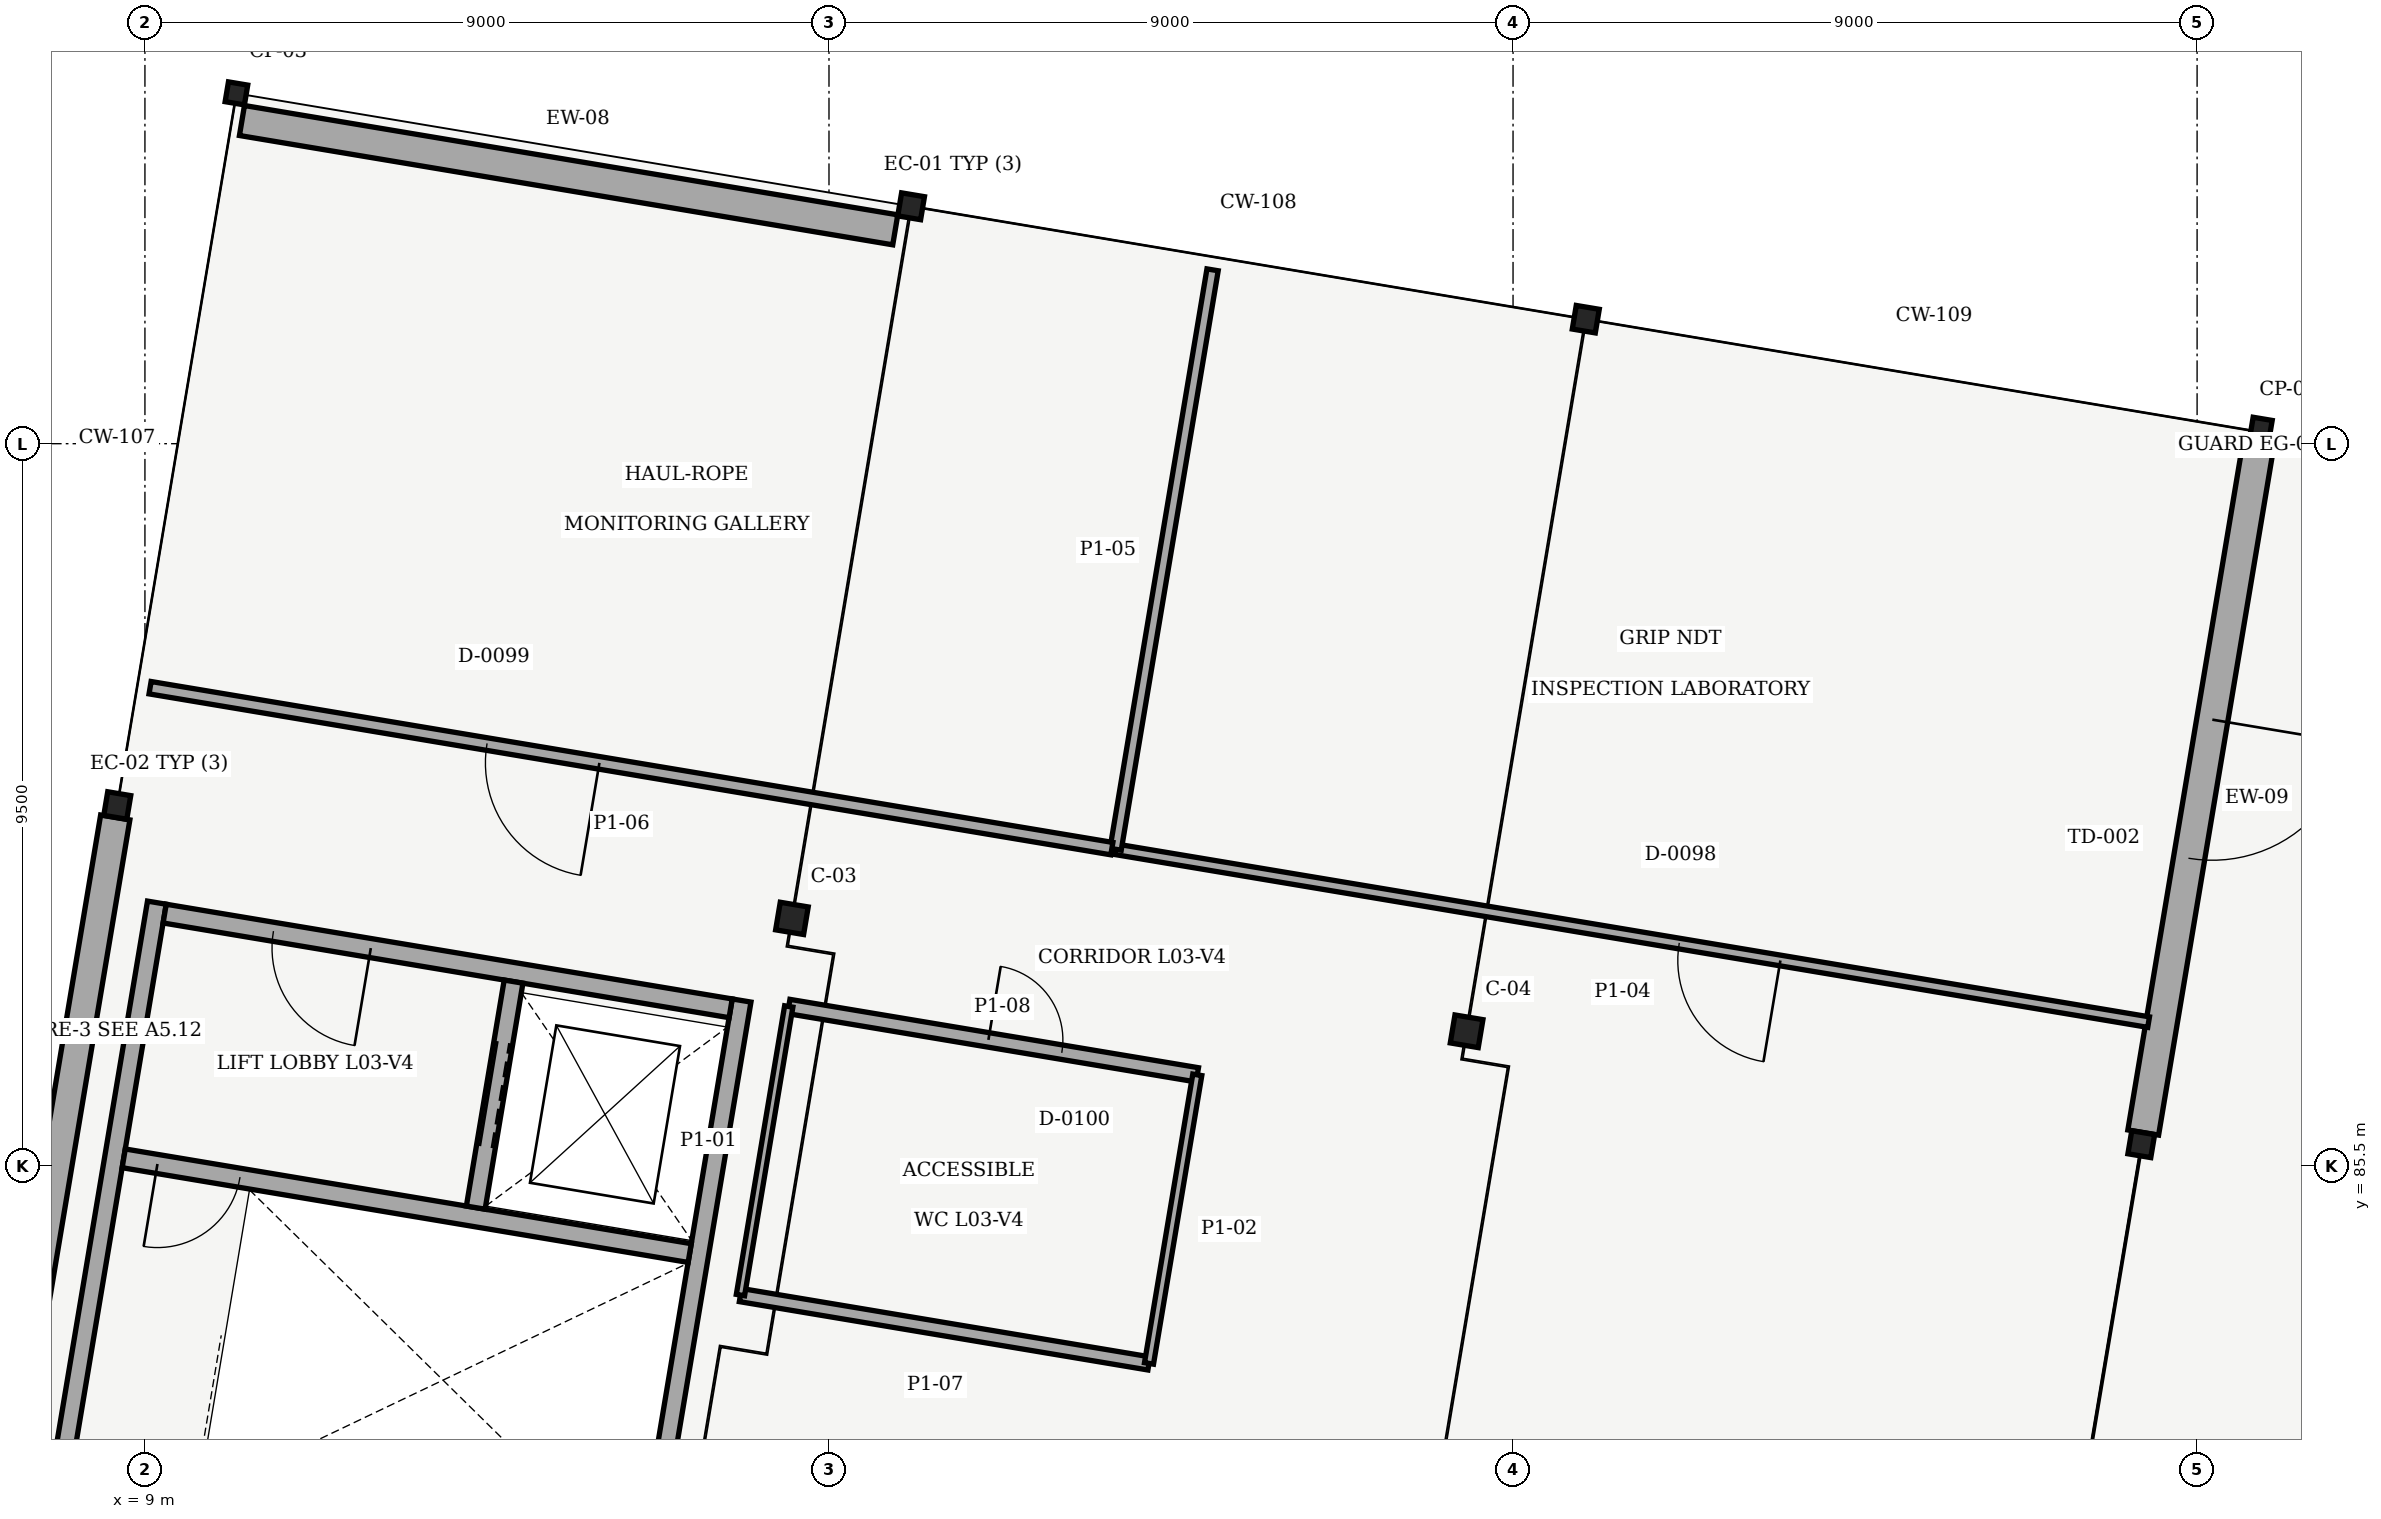
"""IFC4 building model, lengths in metres.
Left out: names, types, materials, properties, quantities, classifications, styles, units other than length and angle.
Written with IfcOpenShell. Run it as: python <this file> out.ifc"""

import sys

from ifc_helpers import new_model, si_unit, direction, frame, frame_2d, origin, origin_with_axes, origin_2d, place, context, subcontext, project, spatial, rectangle, i_section, extrude, element, fill, save


model = new_model("IFC4")
c1 = context("Model", 3, precision=1e-05, world=origin(), true_north=direction((0.0, 1.0)))
c2 = subcontext(c1, "Body", "Model", "MODEL_VIEW")
j1 = project(units=[si_unit("LENGTHUNIT", "METRE"), si_unit("PLANEANGLEUNIT", "RADIAN")], contexts=[c1])
p1 = place(None, origin())
s1 = spatial("IfcSite", under=j1, at=p1, CompositionType="ELEMENT")
p2 = place(p1, origin())
s2 = spatial("IfcBuilding", under=s1, at=p2, CompositionType="ELEMENT")
p3 = place(p2, frame((0.0, 0.0, 14.4)))
s3 = spatial("IfcBuildingStorey", under=s2, at=p3, CompositionType="ELEMENT", Elevation=14.4)
p4 = place(p3, frame((8.636, 90.24, 0.0), z_axis=(0.0, 0.0, 1.0), x_axis=(0.986285601537, -0.165047605861, 0.0)))
e1 = element("IfcColumn", 1, at=p4, inside=s3, PredefinedType="COLUMN", context=c2, shape_type="SweptSolid", body=[
    extrude(i_section(OverallWidth=0.307, OverallDepth=0.315, WebThickness=0.012, FlangeThickness=0.019, FilletRadius=0.013, at=origin_2d()), origin(), (0.0, 0.0, 1.0), 4.8),
])
p5 = place(p3, frame((10.204, 99.609, 0.0), z_axis=(0.0, 0.0, 1.0), x_axis=(0.986285601537, -0.165047605861, 0.0)))
e2 = element("IfcColumn", 2, at=p5, inside=s3, PredefinedType="PILASTER", context=c2, shape_type="SweptSolid", body=[
    extrude(i_section(OverallWidth=0.257, OverallDepth=0.264, WebThickness=0.012, FlangeThickness=0.02, FilletRadius=0.009, at=origin_2d()), origin(), (0.0, 0.0, 1.0), 4.8),
])
p6 = place(p3, frame((17.512, 88.754, 0.0), z_axis=(0.0, 0.0, 1.0), x_axis=(0.986285601537, -0.165047605861, 0.0)))
e3 = element("IfcColumn", 3, at=p6, inside=s3, PredefinedType="COLUMN", context=c2, shape_type="SweptSolid", body=[
    extrude(i_section(OverallWidth=0.373, OverallDepth=0.368, WebThickness=0.015, FlangeThickness=0.024, FilletRadius=0.015, at=origin_2d()), origin(), (0.0, 0.0, 1.0), 4.8),
])
p7 = place(p3, frame((19.08, 98.124, 0.0), z_axis=(0.0, 0.0, 1.0), x_axis=(0.986285601537, -0.165047605861, 0.0)))
e4 = element("IfcColumn", 4, at=p7, inside=s3, PredefinedType="COLUMN", context=c2, shape_type="SweptSolid", body=[
    extrude(i_section(OverallWidth=0.305, OverallDepth=0.307, WebThickness=0.01, FlangeThickness=0.015, FilletRadius=0.013, at=origin_2d()), origin(), (0.0, 0.0, 1.0), 4.8),
])
p8 = place(p3, frame((26.389, 87.269, 0.0), z_axis=(0.0, 0.0, 1.0), x_axis=(0.986285601537, -0.165047605861, 0.0)))
e5 = element("IfcColumn", 5, at=p8, inside=s3, PredefinedType="COLUMN", context=c2, shape_type="SweptSolid", body=[
    extrude(i_section(OverallWidth=0.373, OverallDepth=0.373, WebThickness=0.016, FlangeThickness=0.026, FilletRadius=0.015, at=origin_2d()), origin(), (0.0, 0.0, 1.0), 4.8),
])
p9 = place(p3, frame((27.957, 96.638, 0.0), z_axis=(0.0, 0.0, 1.0), x_axis=(0.986285601537, -0.165047605861, 0.0)))
e6 = element("IfcColumn", 6, at=p9, inside=s3, PredefinedType="COLUMN", context=c2, shape_type="SweptSolid", body=[
    extrude(i_section(OverallWidth=0.307, OverallDepth=0.315, WebThickness=0.012, FlangeThickness=0.019, FilletRadius=0.013, at=origin_2d()), origin(), (0.0, 0.0, 1.0), 4.8),
])
p10 = place(p3, frame((35.266, 85.783, 0.0), z_axis=(0.0, 0.0, 1.0), x_axis=(0.986285601537, -0.165047605861, 0.0)))
e7 = element("IfcColumn", 7, at=p10, inside=s3, PredefinedType="COLUMN", context=c2, shape_type="SweptSolid", body=[
    extrude(i_section(OverallWidth=0.305, OverallDepth=0.307, WebThickness=0.01, FlangeThickness=0.015, FilletRadius=0.013, at=origin_2d()), origin(), (0.0, 0.0, 1.0), 4.8),
])
p11 = place(p3, frame((36.833, 95.153, 0.0), z_axis=(0.0, 0.0, 1.0), x_axis=(0.986285601537, -0.165047605861, 0.0)))
e8 = element("IfcColumn", 8, at=p11, inside=s3, PredefinedType="PILASTER", context=c2, shape_type="SweptSolid", body=[
    extrude(i_section(OverallWidth=0.254, OverallDepth=0.353, WebThickness=0.01, FlangeThickness=0.016, FilletRadius=0.012, at=origin_2d()), origin(), (0.0, 0.0, 1.0), 4.8),
])
p12 = place(p3, frame((7.094, 81.027, 0.0), z_axis=(0.0, 0.0, 1.0), x_axis=(0.165058728342, 0.986283740208, 0.0)))
e9 = element("IfcWall", 9, at=p12, inside=s3, PredefinedType="SOLIDWALL", context=c2, shape_type="SweptSolid", body=[
    extrude(rectangle(XDim=9.181, YDim=0.39, at=frame_2d((4.59, 0.0))), origin(), (0.0, 0.0, 1.0), 3.4),
])
p13 = place(p3, frame((10.276, 99.252, 0.0), z_axis=(0.0, 0.0, 1.0), x_axis=(0.986288479978, -0.165030404055, 0.0)))
e10 = element("IfcWall", 10, at=p13, inside=s3, PredefinedType="SOLIDWALL", context=c2, shape_type="SweptSolid", body=[
    extrude(rectangle(XDim=8.715, YDim=0.4, at=frame_2d((4.357, 0.0))), origin(), (0.0, 0.0, 1.0), 3.4),
])
p14 = place(p3, frame((36.804, 94.977, 0.0), z_axis=(0.0, 0.0, 1.0), x_axis=(-0.165059797175, -0.986283561333, 0.0)))
e11 = element("IfcWall", 11, at=p14, inside=s3, PredefinedType="SOLIDWALL", context=c2, shape_type="SweptSolid", body=[
    extrude(rectangle(XDim=9.166, YDim=0.41, at=frame_2d((4.583, 0.0))), origin(), (0.0, 0.0, 1.0), 3.4),
])
p15 = place(p14, frame((3.658, 0.0, 0.0)))
e12 = element("IfcOpeningElement", 12, at=p15, cuts=e11, PredefinedType="OPENING", context=c2, shape_type="SweptSolid", body=[
    extrude(rectangle(XDim=1.85, YDim=2.2, at=frame_2d((0.925, 1.1))), frame((0.0, 0.215, 0.0), z_axis=(0.0, -1.0, 0.0), x_axis=(1.0, 0.0, 0.0)), (0.0, 0.0, 1.0), 0.43),
])
for number, where, z_axis, x_axis in (
    (13, (7.856, 81.184, 0.0), (0.0, 0.0, 1.0), (0.165, 0.986, 0.0)),
    (14, (15.549, 79.897, 0.0), (0.0, 0.0, 1.0), (0.165, 0.986, 0.0)),
):
    element("IfcWall", number, at=place(p3, frame(where, z_axis=z_axis, x_axis=x_axis)), inside=s3, PredefinedType="SHEAR", context=c2, shape_type="SweptSolid", body=[
        extrude(rectangle(XDim=7.885, YDim=0.25, at=frame_2d((3.942, 0.0))), origin(), (0.0, 0.0, 1.0), 4.54),
    ])
p16 = place(p3, frame((16.167, 84.351, 0.0), z_axis=(0.0, 0.0, 1.0), x_axis=(-0.986286216974, 0.165043928115, 0.0)))
e15 = element("IfcWall", 15, at=p16, inside=s3, PredefinedType="SHEAR", context=c2, shape_type="SweptSolid", body=[
    extrude(rectangle(XDim=7.55, YDim=0.25, at=frame_2d((3.775, 0.0))), origin(), (0.0, 0.0, 1.0), 4.54),
])
p17 = place(p16, frame((6.0, 0.0, 0.0)))
e16 = element("IfcOpeningElement", 16, at=p17, cuts=e15, PredefinedType="OPENING", context=c2, shape_type="SweptSolid", body=[
    extrude(rectangle(XDim=1.1, YDim=2.15, at=frame_2d((0.55, 1.075))), frame((0.0, 0.135, 0.0), z_axis=(0.0, -1.0, 0.0), x_axis=(1.0, 0.0, 0.0)), (0.0, 0.0, 1.0), 0.27),
])
p18 = place(p3, frame((16.706, 87.571, 0.0), z_axis=(0.0, 0.0, 1.0), x_axis=(-0.98628533611, 0.165049191984, 0.0)))
e17 = element("IfcWall", 17, at=p18, inside=s3, PredefinedType="SHEAR", context=c2, shape_type="SweptSolid", body=[
    extrude(rectangle(XDim=7.55, YDim=0.25, at=frame_2d((3.775, 0.0))), origin(), (0.0, 0.0, 1.0), 4.54),
])
p19 = place(p18, frame((4.8, 0.0, 0.0)))
e18 = element("IfcOpeningElement", 18, at=p19, cuts=e17, PredefinedType="OPENING", context=c2, shape_type="SweptSolid", body=[
    extrude(rectangle(XDim=1.3, YDim=2.15, at=frame_2d((0.65, 1.075))), frame((0.0, 0.135, 0.0), z_axis=(0.0, -1.0, 0.0), x_axis=(1.0, 0.0, 0.0)), (0.0, 0.0, 1.0), 0.27),
])
p20 = place(p3, frame((13.352, 84.948, 0.0), z_axis=(0.0, 0.0, 1.0), x_axis=(0.165029254052, 0.986288672401, 0.0)))
e19 = element("IfcWall", 19, at=p20, inside=s3, PredefinedType="SHEAR", context=c2, shape_type="SweptSolid", body=[
    extrude(rectangle(XDim=3.015, YDim=0.25, at=frame_2d((1.507, 0.0))), origin(), (0.0, 0.0, 1.0), 4.54),
])
p21 = place(p20, frame((0.808, 0.0, 0.0)))
e20 = element("IfcOpeningElement", 20, at=p21, cuts=e19, PredefinedType="OPENING", context=c2, shape_type="SweptSolid", body=[
    extrude(rectangle(XDim=1.4, YDim=2.15, at=frame_2d((0.7, 1.075))), frame((0.0, 0.135, 0.0), z_axis=(0.0, -1.0, 0.0), x_axis=(1.0, 0.0, 0.0)), (0.0, 0.0, 1.0), 0.27),
])
p22 = place(p3, frame((35.362, 87.389, 0.0), z_axis=(0.0, 0.0, 1.0), x_axis=(-0.986285012336, 0.165051126748, 0.0)))
e21 = element("IfcWall", 21, at=p22, inside=s3, PredefinedType="PARTITIONING", context=c2, shape_type="SweptSolid", body=[
    extrude(rectangle(XDim=13.78, YDim=0.14, at=frame_2d((6.89, 0.0))), origin(), (0.0, 0.0, 1.0), 3.38),
])
p23 = place(p22, frame((4.912, 0.0, 0.0)))
e22 = element("IfcOpeningElement", 22, at=p23, cuts=e21, PredefinedType="OPENING", context=c2, shape_type="SweptSolid", body=[
    extrude(rectangle(XDim=1.35, YDim=2.2, at=frame_2d((0.675, 1.1))), frame((0.0, 0.08, 0.0), z_axis=(0.0, -1.0, 0.0), x_axis=(1.0, 0.0, 0.0)), (0.0, 0.0, 1.0), 0.16),
])
p24 = place(p3, frame((21.771, 89.664, 0.0), z_axis=(0.0, 0.0, 1.0), x_axis=(0.165054518639, 0.98628444471, 0.0)))
e23 = element("IfcWall", 23, at=p24, inside=s3, PredefinedType="PARTITIONING", context=c2, shape_type="SweptSolid", body=[
    extrude(rectangle(XDim=7.73, YDim=0.15, at=frame_2d((3.865, 0.0))), origin(), (0.0, 0.0, 1.0), 3.38),
])
p25 = place(p3, frame((21.722, 89.672, 0.0), z_axis=(0.0, 0.0, 1.0), x_axis=(-0.986287257997, 0.165037706944, 0.0)))
e24 = element("IfcWall", 24, at=p25, inside=s3, PredefinedType="PARTITIONING", context=c2, shape_type="SweptSolid", body=[
    extrude(rectangle(XDim=12.83, YDim=0.165, at=frame_2d((6.415, 0.0))), origin(), (0.0, 0.0, 1.0), 3.38),
])
p26 = place(p25, frame((6.836, 0.0, 0.0)))
e25 = element("IfcOpeningElement", 25, at=p26, cuts=e24, PredefinedType="OPENING", context=c2, shape_type="SweptSolid", body=[
    extrude(rectangle(XDim=1.5, YDim=2.2, at=frame_2d((0.75, 1.1))), frame((0.0, 0.093, 0.0), z_axis=(0.0, -1.0, 0.0), x_axis=(1.0, 0.0, 0.0)), (0.0, 0.0, 1.0), 0.185),
])
p27 = place(p3, frame((22.21, 82.898, 0.0), z_axis=(0.0, 0.0, 1.0), x_axis=(-0.986281096267, 0.165074526036, 0.0)))
e26 = element("IfcWall", 26, at=p27, inside=s3, PredefinedType="PARTITIONING", context=c2, shape_type="SweptSolid", body=[
    extrude(rectangle(XDim=5.45, YDim=0.175, at=frame_2d((2.725, 0.0))), origin(), (0.0, 0.0, 1.0), 3.38),
])
p28 = place(p3, frame((17.471, 87.595, 0.0), z_axis=(0.0, 0.0, 1.0), x_axis=(0.986288388646, -0.165030949892, 0.0)))
e27 = element("IfcWall", 27, at=p28, inside=s3, PredefinedType="PARTITIONING", context=c2, shape_type="SweptSolid", body=[
    extrude(rectangle(XDim=5.45, YDim=0.19, at=frame_2d((2.725, 0.0))), origin(), (0.0, 0.0, 1.0), 3.38),
])
p29 = place(p28, frame((2.663, 0.0, 0.0)))
e28 = element("IfcOpeningElement", 28, at=p29, cuts=e27, PredefinedType="OPENING", context=c2, shape_type="SweptSolid", body=[
    extrude(rectangle(XDim=0.98, YDim=2.12, at=frame_2d((0.49, 1.06))), frame((0.0, 0.105, 0.0), z_axis=(0.0, -1.0, 0.0), x_axis=(1.0, 0.0, 0.0)), (0.0, 0.0, 1.0), 0.21),
])
p30 = place(p3, frame((16.835, 83.798, 0.0), z_axis=(0.0, 0.0, 1.0), x_axis=(0.165067370347, 0.986282293893, 0.0)))
e29 = element("IfcWall", 29, at=p30, inside=s3, PredefinedType="PARTITIONING", context=c2, shape_type="SweptSolid", body=[
    extrude(rectangle(XDim=3.85, YDim=0.11, at=frame_2d((1.925, 0.0))), origin(), (0.0, 0.0, 1.0), 3.38),
])
p31 = place(p3, frame((22.846, 86.696, 0.0), z_axis=(0.0, 0.0, 1.0), x_axis=(-0.165057046947, -0.986284021595, 0.0)))
e30 = element("IfcWall", 30, at=p31, inside=s3, PredefinedType="PARTITIONING", context=c2, shape_type="SweptSolid", body=[
    extrude(rectangle(XDim=3.85, YDim=0.12, at=frame_2d((1.925, 0.0))), origin(), (0.0, 0.0, 1.0), 3.38),
])
p32 = place(p15, origin_with_axes())
e31 = element("IfcDoor", 31, at=p32, inside=s3, OperationType="SINGLE_SWING_LEFT", PredefinedType="DOOR", context=c2, shape_type="SweptSolid", body=[
    extrude(rectangle(XDim=1.85, YDim=2.2, at=frame_2d((0.925, 1.1))), frame((0.0, 0.025, 0.0), z_axis=(0.0, -1.0, 0.0), x_axis=(1.0, 0.0, 0.0)), (0.0, 0.0, 1.0), 0.05),
])
fill(e12, e31)
p33 = place(p17, origin_with_axes())
e32 = element("IfcDoor", 32, at=p33, inside=s3, OperationType="SINGLE_SWING_RIGHT", PredefinedType="DOOR", context=c2, shape_type="SweptSolid", body=[
    extrude(rectangle(XDim=1.1, YDim=2.15, at=frame_2d((0.55, 1.075))), frame((0.0, 0.025, 0.0), z_axis=(0.0, -1.0, 0.0), x_axis=(1.0, 0.0, 0.0)), (0.0, 0.0, 1.0), 0.05),
])
fill(e16, e32)
p34 = place(p19, origin_with_axes())
e33 = element("IfcDoor", 33, at=p34, inside=s3, OperationType="SINGLE_SWING_LEFT", PredefinedType="DOOR", context=c2, shape_type="SweptSolid", body=[
    extrude(rectangle(XDim=1.3, YDim=2.15, at=frame_2d((0.65, 1.075))), frame((0.0, 0.025, 0.0), z_axis=(0.0, -1.0, 0.0), x_axis=(1.0, 0.0, 0.0)), (0.0, 0.0, 1.0), 0.05),
])
fill(e18, e33)
p35 = place(p21, origin_with_axes())
e34 = element("IfcDoor", 34, at=p35, inside=s3, OperationType="DOUBLE_DOOR_SLIDING", PredefinedType="DOOR", context=c2, shape_type="SweptSolid", body=[
    extrude(rectangle(XDim=1.4, YDim=2.15, at=frame_2d((0.7, 1.075))), frame((0.0, 0.025, 0.0), z_axis=(0.0, -1.0, 0.0), x_axis=(1.0, 0.0, 0.0)), (0.0, 0.0, 1.0), 0.05),
])
fill(e20, e34)
p36 = place(p23, origin_with_axes())
e35 = element("IfcDoor", 35, at=p36, inside=s3, OperationType="SINGLE_SWING_LEFT", PredefinedType="DOOR", context=c2, shape_type="SweptSolid", body=[
    extrude(rectangle(XDim=1.35, YDim=2.2, at=frame_2d((0.675, 1.1))), frame((0.0, 0.025, 0.0), z_axis=(0.0, -1.0, 0.0), x_axis=(1.0, 0.0, 0.0)), (0.0, 0.0, 1.0), 0.05),
])
fill(e22, e35)
p37 = place(p26, origin_with_axes())
e36 = element("IfcDoor", 36, at=p37, inside=s3, OperationType="DOUBLE_DOOR_SINGLE_SWING", PredefinedType="DOOR", context=c2, shape_type="SweptSolid", body=[
    extrude(rectangle(XDim=1.5, YDim=2.2, at=frame_2d((0.75, 1.1))), frame((0.0, 0.025, 0.0), z_axis=(0.0, -1.0, 0.0), x_axis=(1.0, 0.0, 0.0)), (0.0, 0.0, 1.0), 0.05),
])
fill(e25, e36)
p38 = place(p29, origin_with_axes())
e37 = element("IfcDoor", 37, at=p38, inside=s3, OperationType="SINGLE_SWING_LEFT", PredefinedType="DOOR", context=c2, shape_type="SweptSolid", body=[
    extrude(rectangle(XDim=0.98, YDim=2.12, at=frame_2d((0.49, 1.06))), frame((0.0, 0.025, 0.0), z_axis=(0.0, -1.0, 0.0), x_axis=(1.0, 0.0, 0.0)), (0.0, 0.0, 1.0), 0.05),
])
fill(e28, e37)
save(model, sys.argv[1])
